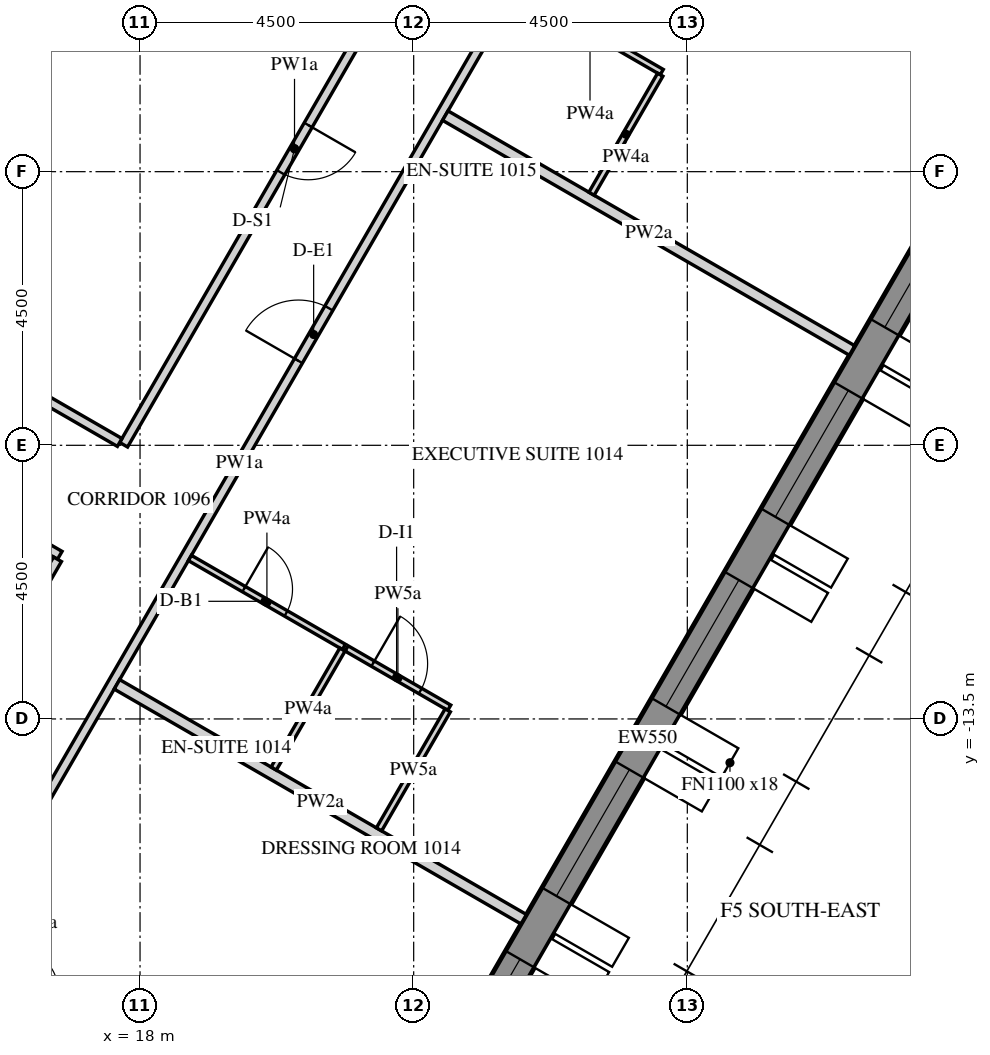
"""IFC4 building model, lengths in metres.
Left out: names, types, materials, properties, quantities, classifications, styles, units other than length and angle.
Written with IfcOpenShell. Run it as: python <this file> out.ifc"""

import sys

from ifc_helpers import new_model, si_unit, direction, frame, frame_2d, origin, place, context, subcontext, project, spatial, polyline, rectangle, outline, extrude, element, fill, save


model = new_model("IFC4")
c1 = context("Model", 3, precision=1e-05, world=origin(), true_north=direction((0.0, 1.0)))
c2 = subcontext(c1, "Body", "Model", "MODEL_VIEW")
j1 = project(units=[si_unit("LENGTHUNIT", "METRE"), si_unit("PLANEANGLEUNIT", "RADIAN")], contexts=[c1])
p1 = place(None, origin())
s1 = spatial("IfcSite", under=j1, at=p1, CompositionType="ELEMENT")
p2 = place(p1, origin())
s2 = spatial("IfcBuilding", under=s1, at=p2, CompositionType="ELEMENT")
p3 = place(p2, frame((0.0, 0.0, 135.0)))
s3 = spatial("IfcBuildingStorey", under=s2, at=p3, CompositionType="ELEMENT", Elevation=135.0)
p4 = place(p3, frame((18.83, -26.835, -0.15), z_axis=(0.0, 0.0, 1.0), x_axis=(0.500003800416, 0.866023209602, 0.0)))
e1 = element("IfcWall", 1, at=p4, inside=s3, PredefinedType="SOLIDWALL", context=c2, shape_type="SweptSolid", body=[
    extrude(outline(polyline([(-0.022, -0.275), (30.097, -0.275), (30.045, 0.275), (0.022, 0.275), (-0.022, -0.275)])), origin(), (0.0, 0.0, 1.0), 3.9),
])
p5 = place(p4, frame((1.236, 0.0, 1.05)))
e2 = element("IfcOpeningElement", 2, at=p5, cuts=e1, PredefinedType="OPENING", context=c2, shape_type="SweptSolid", body=[
    extrude(rectangle(XDim=2.4, YDim=2.4, at=frame_2d((1.2, 1.2))), frame((0.0, 0.285, 0.0), z_axis=(0.0, -1.0, 0.0), x_axis=(1.0, 0.0, 0.0)), (0.0, 0.0, 1.0), 0.57),
])
p6 = place(p4, frame((4.835, 0.0, 1.05)))
e3 = element("IfcOpeningElement", 3, at=p6, cuts=e1, PredefinedType="OPENING", context=c2, shape_type="SweptSolid", body=[
    extrude(rectangle(XDim=2.4, YDim=2.4, at=frame_2d((1.2, 1.2))), frame((0.0, 0.285, 0.0), z_axis=(0.0, -1.0, 0.0), x_axis=(1.0, 0.0, 0.0)), (0.0, 0.0, 1.0), 0.57),
])
p7 = place(p4, frame((8.436, 0.0, 1.05)))
e4 = element("IfcOpeningElement", 4, at=p7, cuts=e1, PredefinedType="OPENING", context=c2, shape_type="SweptSolid", body=[
    extrude(rectangle(XDim=2.4, YDim=2.4, at=frame_2d((1.2, 1.2))), frame((0.0, 0.285, 0.0), z_axis=(0.0, -1.0, 0.0), x_axis=(1.0, 0.0, 0.0)), (0.0, 0.0, 1.0), 0.57),
])
p8 = place(p4, frame((12.035, 0.0, 1.05)))
e5 = element("IfcOpeningElement", 5, at=p8, cuts=e1, PredefinedType="OPENING", context=c2, shape_type="SweptSolid", body=[
    extrude(rectangle(XDim=2.4, YDim=2.4, at=frame_2d((1.2, 1.2))), frame((0.0, 0.285, 0.0), z_axis=(0.0, -1.0, 0.0), x_axis=(1.0, 0.0, 0.0)), (0.0, 0.0, 1.0), 0.57),
])
p9 = place(p4, frame((15.635, 0.0, 1.05)))
e6 = element("IfcOpeningElement", 6, at=p9, cuts=e1, PredefinedType="OPENING", context=c2, shape_type="SweptSolid", body=[
    extrude(rectangle(XDim=2.4, YDim=2.4, at=frame_2d((1.2, 1.2))), frame((0.0, 0.285, 0.0), z_axis=(0.0, -1.0, 0.0), x_axis=(1.0, 0.0, 0.0)), (0.0, 0.0, 1.0), 0.57),
])
p10 = place(p4, frame((19.236, 0.0, 1.05)))
e7 = element("IfcOpeningElement", 7, at=p10, cuts=e1, PredefinedType="OPENING", context=c2, shape_type="SweptSolid", body=[
    extrude(rectangle(XDim=2.4, YDim=2.4, at=frame_2d((1.2, 1.2))), frame((0.0, 0.285, 0.0), z_axis=(0.0, -1.0, 0.0), x_axis=(1.0, 0.0, 0.0)), (0.0, 0.0, 1.0), 0.57),
])
p11 = place(p4, frame((22.835, 0.0, 1.05)))
e8 = element("IfcOpeningElement", 8, at=p11, cuts=e1, PredefinedType="OPENING", context=c2, shape_type="SweptSolid", body=[
    extrude(rectangle(XDim=2.4, YDim=2.4, at=frame_2d((1.2, 1.2))), frame((0.0, 0.285, 0.0), z_axis=(0.0, -1.0, 0.0), x_axis=(1.0, 0.0, 0.0)), (0.0, 0.0, 1.0), 0.57),
])
p12 = place(p4, frame((26.436, 0.0, 1.05)))
e9 = element("IfcOpeningElement", 9, at=p12, cuts=e1, PredefinedType="OPENING", context=c2, shape_type="SweptSolid", body=[
    extrude(rectangle(XDim=2.4, YDim=2.4, at=frame_2d((1.2, 1.2))), frame((0.0, 0.285, 0.0), z_axis=(0.0, -1.0, 0.0), x_axis=(1.0, 0.0, 0.0)), (0.0, 0.0, 1.0), 0.57),
])
p13 = place(p3, frame((8.083, -14.0, -0.15), z_axis=(0.0, 0.0, 1.0), x_axis=(0.499997680643, -0.866026742862, 0.0)))
e10 = element("IfcWall", 10, at=p13, inside=s3, PredefinedType="SHEAR", context=c2, shape_type="SweptSolid", body=[
    extrude(rectangle(XDim=16.509, YDim=0.6, at=frame_2d((8.254, 0.0))), origin(), (0.0, 0.0, 1.0), 3.9),
])
p14 = place(p13, frame((7.354, 0.0, 0.15)))
e11 = element("IfcOpeningElement", 11, at=p14, cuts=e10, PredefinedType="OPENING", context=c2, shape_type="SweptSolid", body=[
    extrude(rectangle(XDim=1.8, YDim=2.4, at=frame_2d((0.9, 1.2))), frame((0.0, 0.31, 0.0), z_axis=(0.0, -1.0, 0.0), x_axis=(1.0, 0.0, 0.0)), (0.0, 0.0, 1.0), 0.62),
])
p15 = place(p3, frame((13.755, -19.475, 0.0), z_axis=(0.0, 0.0, 1.0), x_axis=(0.50000013933, 0.866025323342, 0.0)))
e12 = element("IfcWall", 12, at=p15, inside=s3, PredefinedType="PARTITIONING", context=c2, shape_type="SweptSolid", body=[
    extrude(rectangle(XDim=23.517, YDim=0.15, at=frame_2d((11.758, 0.0))), origin(), (0.0, 0.0, 1.0), 2.838),
])
p16 = place(p15, frame((4.456, 0.0, 0.0)))
e13 = element("IfcOpeningElement", 13, at=p16, cuts=e12, PredefinedType="OPENING", context=c2, shape_type="SweptSolid", body=[
    extrude(rectangle(XDim=1.0, YDim=2.1, at=frame_2d((0.5, 1.05))), frame((0.0, 0.085, 0.0), z_axis=(0.0, -1.0, 0.0), x_axis=(1.0, 0.0, 0.0)), (0.0, 0.0, 1.0), 0.17),
])
p17 = place(p15, frame((13.699, 0.0, 0.0)))
e14 = element("IfcOpeningElement", 14, at=p17, cuts=e12, PredefinedType="OPENING", context=c2, shape_type="SweptSolid", body=[
    extrude(rectangle(XDim=1.0, YDim=2.1, at=frame_2d((0.5, 1.05))), frame((0.0, 0.085, 0.0), z_axis=(0.0, -1.0, 0.0), x_axis=(1.0, 0.0, 0.0)), (0.0, 0.0, 1.0), 0.17),
])
p18 = place(p15, frame((21.658, 0.0, 0.0)))
e15 = element("IfcOpeningElement", 15, at=p18, cuts=e12, PredefinedType="OPENING", context=c2, shape_type="SweptSolid", body=[
    extrude(rectangle(XDim=1.0, YDim=2.1, at=frame_2d((0.5, 1.05))), frame((0.0, 0.085, 0.0), z_axis=(0.0, -1.0, 0.0), x_axis=(1.0, 0.0, 0.0)), (0.0, 0.0, 1.0), 0.17),
])
p19 = place(p3, frame((23.351, 0.745, 0.0), z_axis=(0.0, 0.0, 1.0), x_axis=(-0.500009458068, -0.866019943097, 0.0)))
e16 = element("IfcWall", 16, at=p19, inside=s3, PredefinedType="PARTITIONING", context=c2, shape_type="SweptSolid", body=[
    extrude(rectangle(XDim=11.241, YDim=0.15, at=frame_2d((5.621, 0.0))), origin(), (0.0, 0.0, 1.0), 2.838),
])
p20 = place(p19, frame((5.171, 0.0, 0.0)))
e17 = element("IfcOpeningElement", 17, at=p20, cuts=e16, PredefinedType="OPENING", context=c2, shape_type="SweptSolid", body=[
    extrude(rectangle(XDim=0.9, YDim=2.1, at=frame_2d((0.45, 1.05))), frame((0.0, 0.085, 0.0), z_axis=(0.0, -1.0, 0.0), x_axis=(1.0, 0.0, 0.0)), (0.0, 0.0, 1.0), 0.17),
])
p21 = place(p3, frame((17.665, -8.953, 0.0), z_axis=(0.0, 0.0, 1.0), x_axis=(-0.866025774745, 0.499999357477, 0.0)))
e18 = element("IfcWall", 18, at=p21, inside=s3, PredefinedType="PARTITIONING", context=c2, shape_type="SweptSolid", body=[
    extrude(rectangle(XDim=5.775, YDim=0.15, at=frame_2d((2.887, 0.0))), origin(), (0.0, 0.0, 1.0), 2.838),
])
p22 = place(p3, frame((11.614, -7.884, 0.0), z_axis=(0.0, 0.0, 1.0), x_axis=(0.866018092707, -0.500012662943, 0.0)))
e19 = element("IfcWall", 19, at=p22, inside=s3, PredefinedType="PARTITIONING", context=c2, shape_type="SweptSolid", body=[
    extrude(rectangle(XDim=5.85, YDim=0.15, at=frame_2d((2.925, 0.0))), origin(), (0.0, 0.0, 1.0), 2.838),
])
p23 = place(p3, frame((16.643, -10.874, 0.0), z_axis=(0.0, 0.0, 1.0), x_axis=(-0.50000192383, -0.866024293058, 0.0)))
e20 = element("IfcWall", 20, at=p23, inside=s3, PredefinedType="PARTITIONING", context=c2, shape_type="SweptSolid", body=[
    extrude(rectangle(XDim=8.293, YDim=0.15, at=frame_2d((4.146, 0.0))), origin(), (0.0, 0.0, 1.0), 2.838),
])
p24 = place(p23, frame((3.697, 0.0, 0.0)))
e21 = element("IfcOpeningElement", 21, at=p24, cuts=e20, PredefinedType="OPENING", context=c2, shape_type="SweptSolid", body=[
    extrude(rectangle(XDim=0.9, YDim=2.1, at=frame_2d((0.45, 1.05))), frame((0.0, 0.085, 0.0), z_axis=(0.0, -1.0, 0.0), x_axis=(1.0, 0.0, 0.0)), (0.0, 0.0, 1.0), 0.17),
])
p25 = place(p3, frame((14.977, -17.509, 0.0), z_axis=(0.0, 0.0, 1.0), x_axis=(0.866046596414, -0.499963291492, 0.0)))
e22 = element("IfcWall", 22, at=p25, inside=s3, PredefinedType="PARTITIONING", context=c2, shape_type="SweptSolid", body=[
    extrude(rectangle(XDim=2.925, YDim=0.1, at=frame_2d((1.462, 0.0))), origin(), (0.0, 0.0, 1.0), 2.838),
])
p26 = place(p25, frame((1.025, 0.0, 0.0)))
e23 = element("IfcOpeningElement", 23, at=p26, cuts=e22, PredefinedType="OPENING", context=c2, shape_type="SweptSolid", body=[
    extrude(rectangle(XDim=0.8, YDim=2.1, at=frame_2d((0.4, 1.05))), frame((0.0, 0.06, 0.0), z_axis=(0.0, -1.0, 0.0), x_axis=(1.0, 0.0, 0.0)), (0.0, 0.0, 1.0), 0.12),
])
p27 = place(p3, frame((24.31, -16.794, 0.0), z_axis=(0.0, 0.0, 1.0), x_axis=(-0.866027174938, 0.499996932259, 0.0)))
e24 = element("IfcWall", 24, at=p27, inside=s3, PredefinedType="PARTITIONING", context=c2, shape_type="SweptSolid", body=[
    extrude(rectangle(XDim=7.725, YDim=0.18, at=frame_2d((3.863, 0.0))), origin(), (0.0, 0.0, 1.0), 2.838),
])
p28 = place(p3, frame((18.82, -10.853, 0.0), z_axis=(0.0, 0.0, 1.0), x_axis=(0.866046596414, -0.499963291492, 0.0)))
e25 = element("IfcWall", 25, at=p28, inside=s3, PredefinedType="PARTITIONING", context=c2, shape_type="SweptSolid", body=[
    extrude(rectangle(XDim=2.925, YDim=0.1, at=frame_2d((1.462, 0.0))), origin(), (0.0, 0.0, 1.0), 2.838),
])
p29 = place(p28, frame((1.025, 0.0, 0.0)))
e26 = element("IfcOpeningElement", 26, at=p29, cuts=e25, PredefinedType="OPENING", context=c2, shape_type="SweptSolid", body=[
    extrude(rectangle(XDim=0.8, YDim=2.1, at=frame_2d((0.4, 1.05))), frame((0.0, 0.06, 0.0), z_axis=(0.0, -1.0, 0.0), x_axis=(1.0, 0.0, 0.0)), (0.0, 0.0, 1.0), 0.12),
])
p30 = place(p3, frame((21.396, -12.34, 0.0), z_axis=(0.0, 0.0, 1.0), x_axis=(0.866031321059, -0.49998975084, 0.0)))
e27 = element("IfcWall", 27, at=p30, inside=s3, PredefinedType="PARTITIONING", context=c2, shape_type="SweptSolid", body=[
    extrude(rectangle(XDim=1.95, YDim=0.1, at=frame_2d((0.975, 0.0))), origin(), (0.0, 0.0, 1.0), 2.838),
])
p31 = place(p30, frame((0.5, 0.0, 0.0)))
e28 = element("IfcOpeningElement", 28, at=p31, cuts=e27, PredefinedType="OPENING", context=c2, shape_type="SweptSolid", body=[
    extrude(rectangle(XDim=0.9, YDim=2.1, at=frame_2d((0.45, 1.05))), frame((0.0, 0.06, 0.0), z_axis=(0.0, -1.0, 0.0), x_axis=(1.0, 0.0, 0.0)), (0.0, 0.0, 1.0), 0.12),
])
p32 = place(p3, frame((23.06, -13.359, 0.0), z_axis=(0.0, 0.0, 1.0), x_axis=(-0.49995000081, -0.866054268906, 0.0)))
e29 = element("IfcWall", 29, at=p32, inside=s3, PredefinedType="PARTITIONING", context=c2, shape_type="SweptSolid", body=[
    extrude(rectangle(XDim=2.26, YDim=0.1, at=frame_2d((1.13, 0.0))), origin(), (0.0, 0.0, 1.0), 2.838),
])
p33 = place(p3, frame((29.71, -7.441, 0.0), z_axis=(0.0, 0.0, 1.0), x_axis=(-0.866019273868, 0.500010617176, 0.0)))
e30 = element("IfcWall", 30, at=p33, inside=s3, PredefinedType="PARTITIONING", context=c2, shape_type="SweptSolid", body=[
    extrude(rectangle(XDim=7.725, YDim=0.18, at=frame_2d((3.862, 0.0))), origin(), (0.0, 0.0, 1.0), 2.838),
])
p34 = place(p3, frame((20.198, -14.316, 0.0), z_axis=(0.0, 0.0, 1.0), x_axis=(0.500031020067, 0.8660074936, 0.0)))
e31 = element("IfcWall", 31, at=p34, inside=s3, PredefinedType="PARTITIONING", context=c2, shape_type="SweptSolid", body=[
    extrude(rectangle(XDim=2.26, YDim=0.1, at=frame_2d((1.13, 0.0))), origin(), (0.0, 0.0, 1.0), 2.838),
])
p35 = place(p3, frame((24.22, -1.5, 0.0), z_axis=(0.0, 0.0, 1.0), x_axis=(0.866012511928, -0.500022328685, 0.0)))
e32 = element("IfcWall", 32, at=p35, inside=s3, PredefinedType="PARTITIONING", context=c2, shape_type="SweptSolid", body=[
    extrude(rectangle(XDim=2.725, YDim=0.1, at=frame_2d((1.363, 0.0))), origin(), (0.0, 0.0, 1.0), 2.838),
])
p36 = place(p35, frame((0.925, 0.0, 0.0)))
e33 = element("IfcOpeningElement", 33, at=p36, cuts=e32, PredefinedType="OPENING", context=c2, shape_type="SweptSolid", body=[
    extrude(rectangle(XDim=0.8, YDim=2.1, at=frame_2d((0.4, 1.05))), frame((0.0, 0.06, 0.0), z_axis=(0.0, -1.0, 0.0), x_axis=(1.0, 0.0, 0.0)), (0.0, 0.0, 1.0), 0.12),
])
p37 = place(p3, frame((26.555, -2.906, 0.0), z_axis=(0.0, 0.0, 1.0), x_axis=(-0.500077800282, -0.865980481111, 0.0)))
e34 = element("IfcWall", 34, at=p37, inside=s3, PredefinedType="PARTITIONING", context=c2, shape_type="SweptSolid", body=[
    extrude(rectangle(XDim=2.26, YDim=0.1, at=frame_2d((1.13, 0.0))), origin(), (0.0, 0.0, 1.0), 2.838),
])
p38 = place(p7, frame((0.0, 0.205, 0.0)))
e35 = element("IfcWindow", 35, at=p38, inside=s3, PartitioningType="DOUBLE_PANEL_VERTICAL", PredefinedType="WINDOW", context=c2, shape_type="SweptSolid", body=[
    extrude(rectangle(XDim=2.4, YDim=2.4, at=frame_2d((1.2, 1.2))), frame((0.0, 0.03, 0.0), z_axis=(0.0, -1.0, 0.0), x_axis=(1.0, 0.0, 0.0)), (0.0, 0.0, 1.0), 0.06),
])
fill(e4, e35)
p39 = place(p8, frame((0.0, 0.205, 0.0)))
e36 = element("IfcWindow", 36, at=p39, inside=s3, PartitioningType="DOUBLE_PANEL_VERTICAL", PredefinedType="WINDOW", context=c2, shape_type="SweptSolid", body=[
    extrude(rectangle(XDim=2.4, YDim=2.4, at=frame_2d((1.2, 1.2))), frame((0.0, 0.03, 0.0), z_axis=(0.0, -1.0, 0.0), x_axis=(1.0, 0.0, 0.0)), (0.0, 0.0, 1.0), 0.06),
])
fill(e5, e36)
p40 = place(p9, frame((0.0, 0.205, 0.0)))
e37 = element("IfcWindow", 37, at=p40, inside=s3, PartitioningType="DOUBLE_PANEL_VERTICAL", PredefinedType="WINDOW", context=c2, shape_type="SweptSolid", body=[
    extrude(rectangle(XDim=2.4, YDim=2.4, at=frame_2d((1.2, 1.2))), frame((0.0, 0.03, 0.0), z_axis=(0.0, -1.0, 0.0), x_axis=(1.0, 0.0, 0.0)), (0.0, 0.0, 1.0), 0.06),
])
fill(e6, e37)
p41 = place(p10, frame((0.0, 0.205, 0.0)))
e38 = element("IfcWindow", 38, at=p41, inside=s3, PartitioningType="DOUBLE_PANEL_VERTICAL", PredefinedType="WINDOW", context=c2, shape_type="SweptSolid", body=[
    extrude(rectangle(XDim=2.4, YDim=2.4, at=frame_2d((1.2, 1.2))), frame((0.0, 0.03, 0.0), z_axis=(0.0, -1.0, 0.0), x_axis=(1.0, 0.0, 0.0)), (0.0, 0.0, 1.0), 0.06),
])
fill(e7, e38)
p42 = place(p11, frame((0.0, 0.205, 0.0)))
e39 = element("IfcWindow", 39, at=p42, inside=s3, PartitioningType="DOUBLE_PANEL_VERTICAL", PredefinedType="WINDOW", context=c2, shape_type="SweptSolid", body=[
    extrude(rectangle(XDim=2.4, YDim=2.4, at=frame_2d((1.2, 1.2))), frame((0.0, 0.03, 0.0), z_axis=(0.0, -1.0, 0.0), x_axis=(1.0, 0.0, 0.0)), (0.0, 0.0, 1.0), 0.06),
])
fill(e8, e39)
p43 = place(p17, origin())
e40 = element("IfcDoor", 40, at=p43, inside=s3, OperationType="SINGLE_SWING_RIGHT", PredefinedType="DOOR", context=c2, shape_type="SweptSolid", body=[
    extrude(rectangle(XDim=1.0, YDim=2.1, at=frame_2d((0.5, 1.05))), frame((0.0, 0.025, 0.0), z_axis=(0.0, -1.0, 0.0), x_axis=(1.0, 0.0, 0.0)), (0.0, 0.0, 1.0), 0.05),
])
fill(e14, e40)
p44 = place(p29, origin())
e41 = element("IfcDoor", 41, at=p44, inside=s3, OperationType="SINGLE_SWING_RIGHT", PredefinedType="DOOR", context=c2, shape_type="SweptSolid", body=[
    extrude(rectangle(XDim=0.8, YDim=2.1, at=frame_2d((0.4, 1.05))), frame((0.0, 0.025, 0.0), z_axis=(0.0, -1.0, 0.0), x_axis=(1.0, 0.0, 0.0)), (0.0, 0.0, 1.0), 0.05),
])
fill(e26, e41)
p45 = place(p31, origin())
e42 = element("IfcDoor", 42, at=p45, inside=s3, OperationType="SINGLE_SWING_RIGHT", PredefinedType="DOOR", context=c2, shape_type="SweptSolid", body=[
    extrude(rectangle(XDim=0.9, YDim=2.1, at=frame_2d((0.45, 1.05))), frame((0.0, 0.025, 0.0), z_axis=(0.0, -1.0, 0.0), x_axis=(1.0, 0.0, 0.0)), (0.0, 0.0, 1.0), 0.05),
])
fill(e28, e42)
p46 = place(p20, origin())
e43 = element("IfcDoor", 43, at=p46, inside=s3, OperationType="SINGLE_SWING_LEFT", PredefinedType="DOOR", context=c2, shape_type="SweptSolid", body=[
    extrude(rectangle(XDim=0.9, YDim=2.1, at=frame_2d((0.45, 1.05))), frame((0.0, 0.025, 0.0), z_axis=(0.0, -1.0, 0.0), x_axis=(1.0, 0.0, 0.0)), (0.0, 0.0, 1.0), 0.05),
])
fill(e17, e43)
save(model, sys.argv[1])
